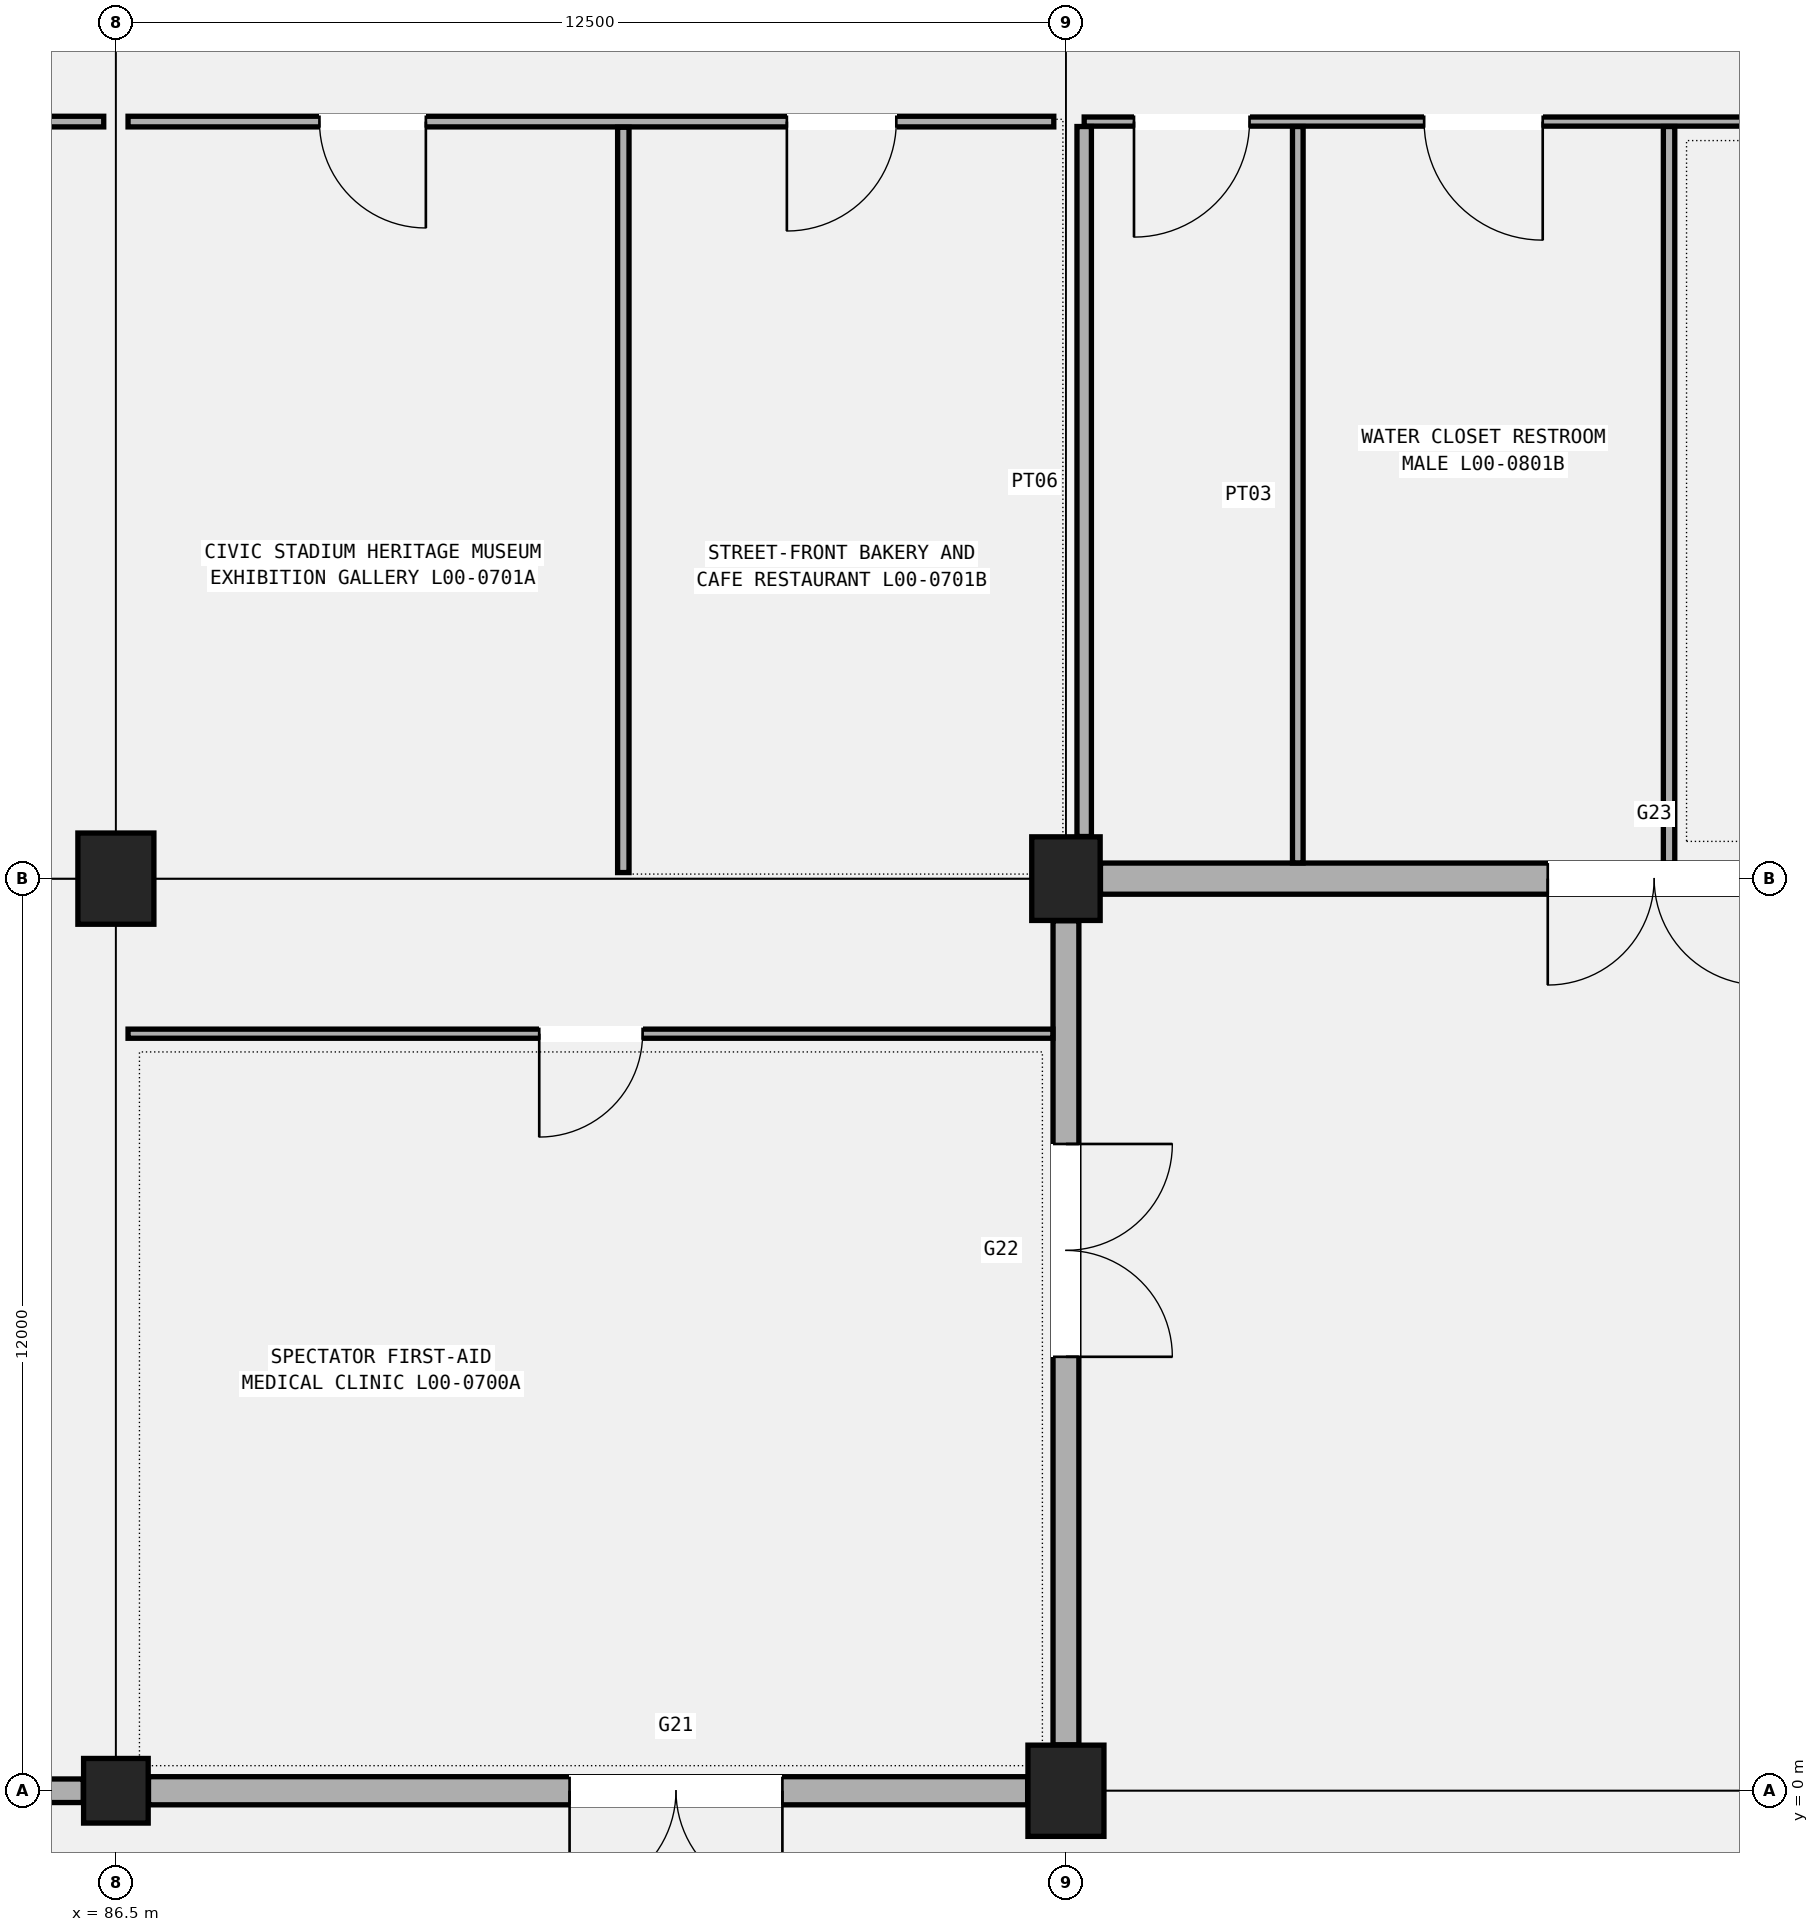
"""IFC4 building model, lengths in metres.
Left out: names, types, materials, properties, quantities, classifications, styles, units other than length and angle.
Written with IfcOpenShell. Run it as: python <this file> out.ifc"""

import sys

from ifc_helpers import new_model, si_unit, direction, frame, frame_2d, origin, origin_2d, place, context, subcontext, project, spatial, rectangle, circle, extrude, element, fill, save


model = new_model("IFC4")
c1 = context("Model", 3, precision=1e-05, world=origin(), true_north=direction((0.0, 1.0)))
c2 = subcontext(c1, "Body", "Model", "MODEL_VIEW")
j1 = project(units=[si_unit("LENGTHUNIT", "METRE"), si_unit("PLANEANGLEUNIT", "RADIAN")], contexts=[c1])
p1 = place(None, origin())
s1 = spatial("IfcSite", under=j1, at=p1, CompositionType="ELEMENT")
p2 = place(p1, origin())
s2 = spatial("IfcBuilding", under=s1, at=p2, CompositionType="ELEMENT")
p3 = place(p2, origin())
s3 = spatial("IfcBuildingStorey", under=s2, at=p3, CompositionType="ELEMENT", Elevation=0.0)
p4 = place(p3, frame((86.5, 0.0, 0.0), z_axis=(0.0, 0.0, 1.0), x_axis=(1.0, 0.0, 0.0)))
e1 = element("IfcColumn", 1, at=p4, inside=s3, PredefinedType="COLUMN", context=c2, shape_type="SweptSolid", body=[
    extrude(circle(Radius=0.425, at=origin_2d()), origin(), (0.0, 0.0, 1.0), 5.4),
])
for number, where, z_axis, x_axis in (
    (2, (86.5, 12.0, 0.0), (0.0, 0.0, 1.0), (1.0, 0.0, 0.0)),
    (3, (99.0, 0.0, 0.0), (0.0, 0.0, 1.0), (1.0, 0.0, 0.0)),
):
    element("IfcColumn", number, at=place(p3, frame(where, z_axis=z_axis, x_axis=x_axis)), inside=s3, PredefinedType="COLUMN", context=c2, shape_type="SweptSolid", body=[
        extrude(rectangle(XDim=1.0, YDim=1.2, at=origin_2d()), origin(), (0.0, 0.0, 1.0), 5.4),
    ])
p5 = place(p3, frame((99.0, 12.0, 0.0), z_axis=(0.0, 0.0, 1.0), x_axis=(1.0, 0.0, 0.0)))
e4 = element("IfcColumn", 4, at=p5, inside=s3, PredefinedType="COLUMN", context=c2, shape_type="SweptSolid", body=[
    extrude(rectangle(XDim=0.9, YDim=1.1, at=origin_2d()), origin(), (0.0, 0.0, 1.0), 5.4),
])
p6 = place(p3, frame((74.404, 0.0, 0.0), z_axis=(0.0, 0.0, 1.0), x_axis=(1.0, 0.0, 0.0)))
e5 = element("IfcWall", 5, at=p6, inside=s3, PredefinedType="SOLIDWALL", context=c2, shape_type="SweptSolid", body=[
    extrude(rectangle(XDim=11.667, YDim=0.31, at=frame_2d((5.833, 0.0))), origin(), (0.0, 0.0, 1.0), 4.24),
])
p7 = place(p6, frame((8.4, 0.0, 0.0), z_axis=(0.0, 0.0, 1.0), x_axis=(-1.0, 0.0, 0.0)))
e6 = element("IfcOpeningElement", 6, at=p7, cuts=e5, PredefinedType="OPENING", context=c2, shape_type="SweptSolid", body=[
    extrude(rectangle(XDim=2.8, YDim=2.4, at=frame_2d((1.4, 1.2))), frame((0.0, 0.165, 0.0), z_axis=(0.0, -1.0, 0.0), x_axis=(1.0, 0.0, 0.0)), (0.0, 0.0, 1.0), 0.33),
])
p8 = place(p3, frame((86.929, 0.0, 0.0), z_axis=(0.0, 0.0, 1.0), x_axis=(1.0, 0.0, 0.0)))
e7 = element("IfcWall", 7, at=p8, inside=s3, PredefinedType="SOLIDWALL", context=c2, shape_type="SweptSolid", body=[
    extrude(rectangle(XDim=11.567, YDim=0.37, at=frame_2d((5.784, 0.0))), origin(), (0.0, 0.0, 1.0), 4.34),
])
p9 = place(p8, frame((8.34, 0.0, 0.0), z_axis=(0.0, 0.0, 1.0), x_axis=(-1.0, 0.0, 0.0)))
e8 = element("IfcOpeningElement", 8, at=p9, cuts=e7, PredefinedType="OPENING", context=c2, shape_type="SweptSolid", body=[
    extrude(rectangle(XDim=2.8, YDim=2.4, at=frame_2d((1.4, 1.2))), frame((0.0, 0.195, 0.0), z_axis=(0.0, -1.0, 0.0), x_axis=(1.0, 0.0, 0.0)), (0.0, 0.0, 1.0), 0.39),
])
p10 = place(p3, frame((99.0, 0.604, 0.0), z_axis=(0.0, 0.0, 1.0), x_axis=(0.0, 1.0, 0.0)))
e9 = element("IfcWall", 9, at=p10, inside=s3, PredefinedType="SOLIDWALL", context=c2, shape_type="SweptSolid", body=[
    extrude(rectangle(XDim=10.842, YDim=0.34, at=frame_2d((5.421, 0.0))), origin(), (0.0, 0.0, 1.0), 4.44),
])
p11 = place(p10, frame((7.905, 0.0, 0.0), z_axis=(0.0, 0.0, 1.0), x_axis=(-1.0, 0.0, 0.0)))
e10 = element("IfcOpeningElement", 10, at=p11, cuts=e9, PredefinedType="OPENING", context=c2, shape_type="SweptSolid", body=[
    extrude(rectangle(XDim=2.8, YDim=2.4, at=frame_2d((1.4, 1.2))), frame((0.0, 0.18, 0.0), z_axis=(0.0, -1.0, 0.0), x_axis=(1.0, 0.0, 0.0)), (0.0, 0.0, 1.0), 0.36),
])
p12 = place(p3, frame((99.454, 12.0, 0.0), z_axis=(0.0, 0.0, 1.0), x_axis=(1.0, 0.0, 0.0)))
e11 = element("IfcWall", 11, at=p12, inside=s3, PredefinedType="SOLIDWALL", context=c2, shape_type="SweptSolid", body=[
    extrude(rectangle(XDim=12.142, YDim=0.41, at=frame_2d((6.071, 0.0))), origin(), (0.0, 0.0, 1.0), 4.24),
])
p13 = place(p12, frame((8.685, 0.0, 0.0), z_axis=(0.0, 0.0, 1.0), x_axis=(-1.0, 0.0, 0.0)))
e12 = element("IfcOpeningElement", 12, at=p13, cuts=e11, PredefinedType="OPENING", context=c2, shape_type="SweptSolid", body=[
    extrude(rectangle(XDim=2.8, YDim=2.4, at=frame_2d((1.4, 1.2))), frame((0.0, 0.215, 0.0), z_axis=(0.0, -1.0, 0.0), x_axis=(1.0, 0.0, 0.0)), (0.0, 0.0, 1.0), 0.43),
])
p14 = place(p3, frame((74.16, 21.96, 0.0), z_axis=(0.0, 0.0, 1.0), x_axis=(1.0, 0.0, 0.0)))
e13 = element("IfcWall", 13, at=p14, inside=s3, PredefinedType="PARTITIONING", context=c2, shape_type="SweptSolid", body=[
    extrude(rectangle(XDim=12.18, YDim=0.14, at=frame_2d((6.09, 0.0))), origin(), (0.0, 0.0, 1.0), 4.52),
])
p15 = place(p14, frame((6.71, 0.0, 0.0), z_axis=(0.0, 0.0, 1.0), x_axis=(-1.0, 0.0, 0.0)))
e14 = element("IfcOpeningElement", 14, at=p15, cuts=e13, PredefinedType="OPENING", context=c2, shape_type="SweptSolid", body=[
    extrude(rectangle(XDim=1.24, YDim=2.22, at=frame_2d((0.62, 1.11))), frame((0.0, 0.08, 0.0), z_axis=(0.0, -1.0, 0.0), x_axis=(1.0, 0.0, 0.0)), (0.0, 0.0, 1.0), 0.16),
])
p16 = place(p3, frame((86.66, 9.96, 0.0), z_axis=(0.0, 0.0, 1.0), x_axis=(1.0, 0.0, 0.0)))
e15 = element("IfcWall", 15, at=p16, inside=s3, PredefinedType="PARTITIONING", context=c2, shape_type="SweptSolid", body=[
    extrude(rectangle(XDim=12.168, YDim=0.12, at=frame_2d((6.084, 0.0))), origin(), (0.0, 0.0, 1.0), 4.52),
])
p17 = place(p16, frame((6.77, 0.0, 0.0), z_axis=(0.0, 0.0, 1.0), x_axis=(-1.0, 0.0, 0.0)))
e16 = element("IfcOpeningElement", 16, at=p17, cuts=e15, PredefinedType="OPENING", context=c2, shape_type="SweptSolid", body=[
    extrude(rectangle(XDim=1.36, YDim=2.25, at=frame_2d((0.68, 1.125))), frame((0.0, 0.07, 0.0), z_axis=(0.0, -1.0, 0.0), x_axis=(1.0, 0.0, 0.0)), (0.0, 0.0, 1.0), 0.14),
])
p18 = place(p3, frame((86.66, 21.96, 0.0), z_axis=(0.0, 0.0, 1.0), x_axis=(1.0, 0.0, 0.0)))
e17 = element("IfcWall", 17, at=p18, inside=s3, PredefinedType="PARTITIONING", context=c2, shape_type="SweptSolid", body=[
    extrude(rectangle(XDim=12.18, YDim=0.14, at=frame_2d((6.09, 0.0))), origin(), (0.0, 0.0, 1.0), 4.52),
])
p19 = place(p18, frame((3.918, 0.0, 0.0), z_axis=(0.0, 0.0, 1.0), x_axis=(-1.0, 0.0, 0.0)))
e18 = element("IfcOpeningElement", 18, at=p19, cuts=e17, PredefinedType="OPENING", context=c2, shape_type="SweptSolid", body=[
    extrude(rectangle(XDim=1.4, YDim=2.24, at=frame_2d((0.7, 1.12))), frame((0.0, 0.08, 0.0), z_axis=(0.0, -1.0, 0.0), x_axis=(1.0, 0.0, 0.0)), (0.0, 0.0, 1.0), 0.16),
])
p20 = place(p18, frame((10.108, 0.0, 0.0), z_axis=(0.0, 0.0, 1.0), x_axis=(-1.0, 0.0, 0.0)))
e19 = element("IfcOpeningElement", 19, at=p20, cuts=e17, PredefinedType="OPENING", context=c2, shape_type="SweptSolid", body=[
    extrude(rectangle(XDim=1.44, YDim=2.26, at=frame_2d((0.72, 1.13))), frame((0.0, 0.08, 0.0), z_axis=(0.0, -1.0, 0.0), x_axis=(1.0, 0.0, 0.0)), (0.0, 0.0, 1.0), 0.16),
])
p21 = place(p3, frame((93.176, 12.08, 0.0), z_axis=(0.0, 0.0, 1.0), x_axis=(0.0, 1.0, 0.0)))
e20 = element("IfcWall", 20, at=p21, inside=s3, PredefinedType="PARTITIONING", context=c2, shape_type="SweptSolid", body=[
    extrude(rectangle(XDim=9.805, YDim=0.15, at=frame_2d((4.902, 0.0))), origin(), (0.0, 0.0, 1.0), 4.52),
])
p22 = place(p3, frame((99.24, 21.96, 0.0), z_axis=(0.0, 0.0, 1.0), x_axis=(1.0, 0.0, 0.0)))
e21 = element("IfcWall", 21, at=p22, inside=s3, PredefinedType="PARTITIONING", context=c2, shape_type="SweptSolid", body=[
    extrude(rectangle(XDim=12.52, YDim=0.12, at=frame_2d((6.26, 0.0))), origin(), (0.0, 0.0, 1.0), 4.52),
])
p23 = place(p22, frame((2.175, 0.0, 0.0), z_axis=(0.0, 0.0, 1.0), x_axis=(-1.0, 0.0, 0.0)))
e22 = element("IfcOpeningElement", 22, at=p23, cuts=e21, PredefinedType="OPENING", context=c2, shape_type="SweptSolid", body=[
    extrude(rectangle(XDim=1.52, YDim=2.28, at=frame_2d((0.76, 1.14))), frame((0.0, 0.07, 0.0), z_axis=(0.0, -1.0, 0.0), x_axis=(1.0, 0.0, 0.0)), (0.0, 0.0, 1.0), 0.14),
])
p24 = place(p22, frame((6.033, 0.0, 0.0), z_axis=(0.0, 0.0, 1.0), x_axis=(-1.0, 0.0, 0.0)))
e23 = element("IfcOpeningElement", 23, at=p24, cuts=e21, PredefinedType="OPENING", context=c2, shape_type="SweptSolid", body=[
    extrude(rectangle(XDim=1.56, YDim=2.26, at=frame_2d((0.78, 1.13))), frame((0.0, 0.07, 0.0), z_axis=(0.0, -1.0, 0.0), x_axis=(1.0, 0.0, 0.0)), (0.0, 0.0, 1.0), 0.14),
])
p25 = place(p22, frame((10.898, 0.0, 0.0), z_axis=(0.0, 0.0, 1.0), x_axis=(-1.0, 0.0, 0.0)))
e24 = element("IfcOpeningElement", 24, at=p25, cuts=e21, PredefinedType="OPENING", context=c2, shape_type="SweptSolid", body=[
    extrude(rectangle(XDim=1.6, YDim=2.3, at=frame_2d((0.8, 1.15))), frame((0.0, 0.07, 0.0), z_axis=(0.0, -1.0, 0.0), x_axis=(1.0, 0.0, 0.0)), (0.0, 0.0, 1.0), 0.14),
])
p26 = place(p3, frame((99.24, 12.554, 0.0), z_axis=(0.0, 0.0, 1.0), x_axis=(0.0, 1.0, 0.0)))
e25 = element("IfcWall", 25, at=p26, inside=s3, PredefinedType="PARTITIONING", context=c2, shape_type="SweptSolid", body=[
    extrude(rectangle(XDim=9.341, YDim=0.19, at=frame_2d((4.67, 0.0))), origin(), (0.0, 0.0, 1.0), 4.2),
])
p27 = place(p3, frame((102.05, 12.207, 0.0), z_axis=(0.0, 0.0, 1.0), x_axis=(0.0, 1.0, 0.0)))
e26 = element("IfcWall", 26, at=p27, inside=s3, PredefinedType="PARTITIONING", context=c2, shape_type="SweptSolid", body=[
    extrude(rectangle(XDim=9.688, YDim=0.14, at=frame_2d((4.844, 0.0))), origin(), (0.0, 0.0, 1.0), 4.52),
])
p28 = place(p3, frame((106.935, 12.207, 0.0), z_axis=(0.0, 0.0, 1.0), x_axis=(0.0, 1.0, 0.0)))
e27 = element("IfcWall", 27, at=p28, inside=s3, PredefinedType="PARTITIONING", context=c2, shape_type="SweptSolid", body=[
    extrude(rectangle(XDim=9.688, YDim=0.15, at=frame_2d((4.844, 0.0))), origin(), (0.0, 0.0, 1.0), 4.52),
])
p29 = place(p9, origin())
e28 = element("IfcDoor", 28, at=p29, inside=s3, OperationType="DOUBLE_DOOR_SINGLE_SWING", PredefinedType="DOOR", context=c2, shape_type="SweptSolid", body=[
    extrude(rectangle(XDim=2.8, YDim=2.4, at=frame_2d((1.4, 1.2))), frame((0.0, 0.025, 0.0), z_axis=(0.0, -1.0, 0.0), x_axis=(1.0, 0.0, 0.0)), (0.0, 0.0, 1.0), 0.05),
])
fill(e8, e28)
p30 = place(p11, origin())
e29 = element("IfcDoor", 29, at=p30, inside=s3, OperationType="DOUBLE_DOOR_SINGLE_SWING", PredefinedType="DOOR", context=c2, shape_type="SweptSolid", body=[
    extrude(rectangle(XDim=2.8, YDim=2.4, at=frame_2d((1.4, 1.2))), frame((0.0, 0.025, 0.0), z_axis=(0.0, -1.0, 0.0), x_axis=(1.0, 0.0, 0.0)), (0.0, 0.0, 1.0), 0.05),
])
fill(e10, e29)
p31 = place(p13, origin())
e30 = element("IfcDoor", 30, at=p31, inside=s3, OperationType="DOUBLE_DOOR_SINGLE_SWING", PredefinedType="DOOR", context=c2, shape_type="SweptSolid", body=[
    extrude(rectangle(XDim=2.8, YDim=2.4, at=frame_2d((1.4, 1.2))), frame((0.0, 0.025, 0.0), z_axis=(0.0, -1.0, 0.0), x_axis=(1.0, 0.0, 0.0)), (0.0, 0.0, 1.0), 0.05),
])
fill(e12, e30)
p32 = place(p17, origin())
e31 = element("IfcDoor", 31, at=p32, inside=s3, OperationType="SINGLE_SWING_RIGHT", PredefinedType="DOOR", context=c2, shape_type="SweptSolid", body=[
    extrude(rectangle(XDim=1.36, YDim=2.25, at=frame_2d((0.68, 1.125))), frame((0.0, 0.025, 0.0), z_axis=(0.0, -1.0, 0.0), x_axis=(1.0, 0.0, 0.0)), (0.0, 0.0, 1.0), 0.05),
])
fill(e16, e31)
p33 = place(p19, origin())
e32 = element("IfcDoor", 32, at=p33, inside=s3, OperationType="SINGLE_SWING_LEFT", PredefinedType="DOOR", context=c2, shape_type="SweptSolid", body=[
    extrude(rectangle(XDim=1.4, YDim=2.24, at=frame_2d((0.7, 1.12))), frame((0.0, 0.025, 0.0), z_axis=(0.0, -1.0, 0.0), x_axis=(1.0, 0.0, 0.0)), (0.0, 0.0, 1.0), 0.05),
])
fill(e18, e32)
p34 = place(p20, origin())
e33 = element("IfcDoor", 33, at=p34, inside=s3, OperationType="SINGLE_SWING_RIGHT", PredefinedType="DOOR", context=c2, shape_type="SweptSolid", body=[
    extrude(rectangle(XDim=1.44, YDim=2.26, at=frame_2d((0.72, 1.13))), frame((0.0, 0.025, 0.0), z_axis=(0.0, -1.0, 0.0), x_axis=(1.0, 0.0, 0.0)), (0.0, 0.0, 1.0), 0.05),
])
fill(e19, e33)
p35 = place(p23, origin())
e34 = element("IfcDoor", 34, at=p35, inside=s3, OperationType="SINGLE_SWING_RIGHT", PredefinedType="DOOR", context=c2, shape_type="SweptSolid", body=[
    extrude(rectangle(XDim=1.52, YDim=2.28, at=frame_2d((0.76, 1.14))), frame((0.0, 0.025, 0.0), z_axis=(0.0, -1.0, 0.0), x_axis=(1.0, 0.0, 0.0)), (0.0, 0.0, 1.0), 0.05),
])
fill(e22, e34)
p36 = place(p24, origin())
e35 = element("IfcDoor", 35, at=p36, inside=s3, OperationType="SINGLE_SWING_LEFT", PredefinedType="DOOR", context=c2, shape_type="SweptSolid", body=[
    extrude(rectangle(XDim=1.56, YDim=2.26, at=frame_2d((0.78, 1.13))), frame((0.0, 0.025, 0.0), z_axis=(0.0, -1.0, 0.0), x_axis=(1.0, 0.0, 0.0)), (0.0, 0.0, 1.0), 0.05),
])
fill(e23, e35)
save(model, sys.argv[1])
